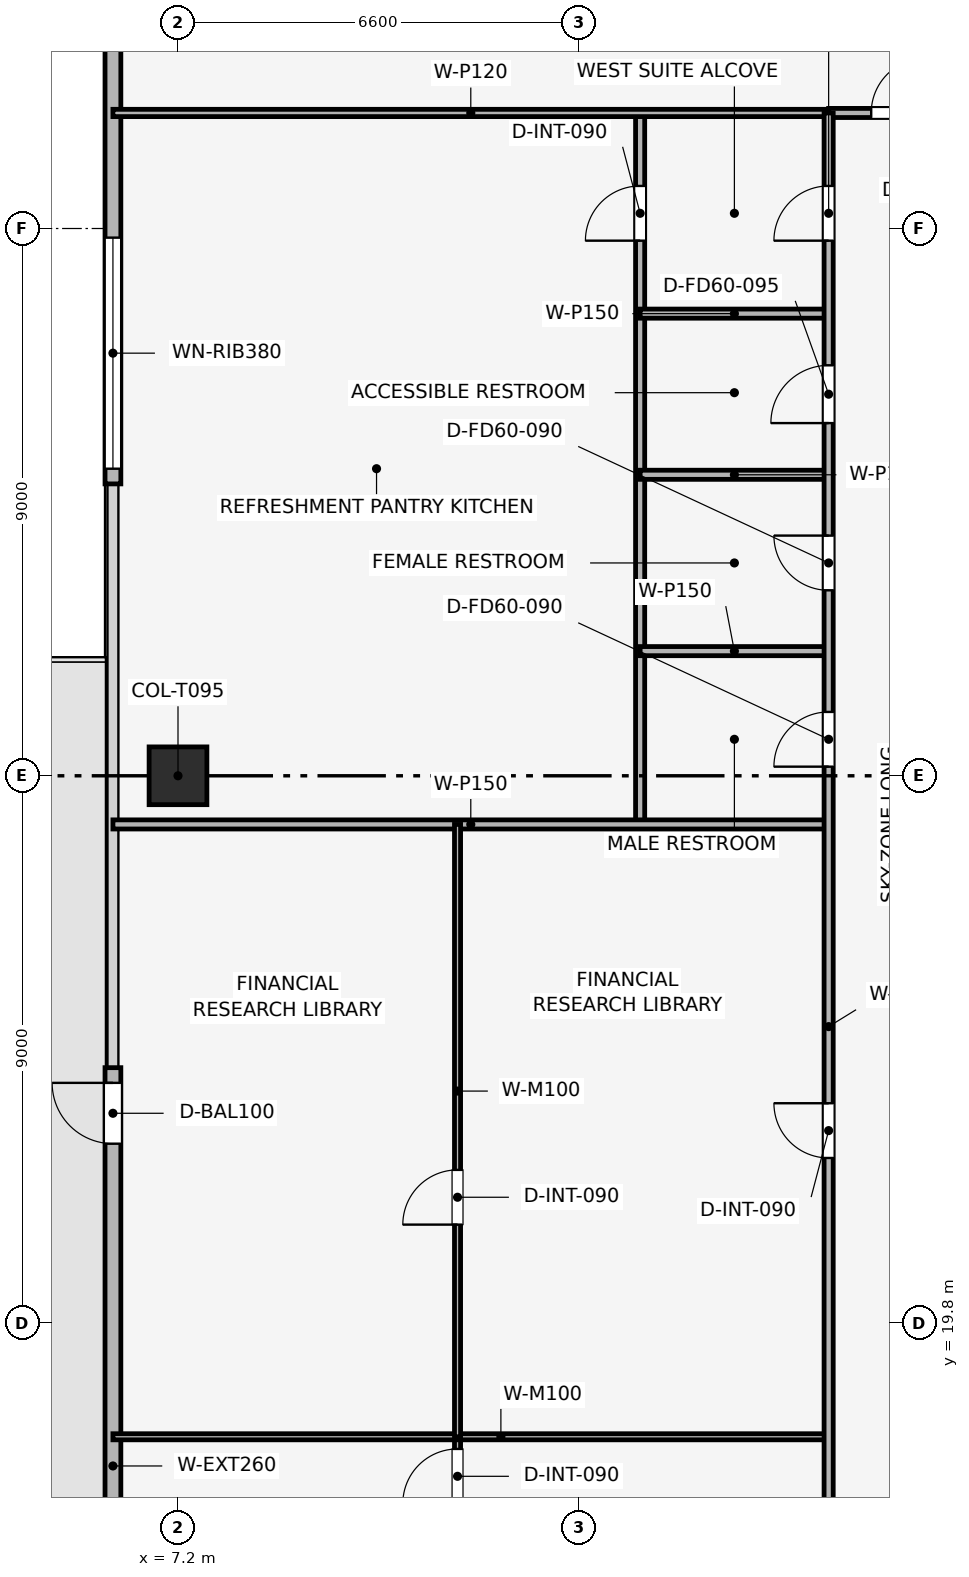
"""IFC4 building model, lengths in metres.
Left out: names, types, materials, properties, quantities, classifications, styles, units other than length and angle.
Written with IfcOpenShell. Run it as: python <this file> out.ifc"""

import sys

from ifc_helpers import new_model, si_unit, direction, frame, frame_2d, origin, origin_2d, place, context, subcontext, project, spatial, rectangle, extrude, element, fill, save


model = new_model("IFC4")
c1 = context("Model", 3, precision=1e-05, world=origin(), true_north=direction((0.0, 1.0)))
c2 = subcontext(c1, "Body", "Model", "MODEL_VIEW")
j1 = project(units=[si_unit("LENGTHUNIT", "METRE"), si_unit("PLANEANGLEUNIT", "RADIAN")], contexts=[c1])
p1 = place(None, origin())
s1 = spatial("IfcSite", under=j1, at=p1, CompositionType="ELEMENT")
p2 = place(p1, origin())
s2 = spatial("IfcBuilding", under=s1, at=p2, CompositionType="ELEMENT")
p3 = place(p2, frame((0.0, 0.0, 329.25)))
s3 = spatial("IfcBuildingStorey", under=s2, at=p3, CompositionType="ELEMENT", Elevation=329.25)
p4 = place(p3, frame((7.2, 28.8, 0.003), z_axis=(0.158092459532, 0.0, 0.98742431317), x_axis=(0.0, 1.0, 0.0)))
e1 = element("IfcColumn", 1, at=p4, inside=s3, PredefinedType="COLUMN", context=c2, shape_type="SweptSolid", body=[
    extrude(rectangle(XDim=0.95, YDim=0.95, at=origin_2d()), origin(), (0.0, 0.0, 1.0), 3.549),
])
p5 = place(p3, frame((6.13, 12.3, 0.0), z_axis=(0.0, 0.0, 1.0), x_axis=(0.0, 1.0, 0.0)))
e2 = element("IfcWall", 2, at=p5, inside=s3, PredefinedType="SOLIDWALL", context=c2, shape_type="SweptSolid", body=[
    extrude(rectangle(XDim=11.7, YDim=0.26, at=frame_2d((5.85, 0.0))), origin(), (0.0, 0.0, 1.0), 3.51),
])
p6 = place(p5, frame((10.45, 0.0, 0.0)))
e3 = element("IfcOpeningElement", 3, at=p6, cuts=e2, PredefinedType="OPENING", context=c2, shape_type="SweptSolid", body=[
    extrude(rectangle(XDim=1.0, YDim=2.2, at=frame_2d((0.5, 1.1))), frame((0.0, 0.14, 0.0), z_axis=(0.0, -1.0, 0.0), x_axis=(1.0, 0.0, 0.0)), (0.0, 0.0, 1.0), 0.28),
])
p7 = place(p3, frame((6.13, 33.6, 0.0), z_axis=(0.0, 0.0, 1.0), x_axis=(0.0, 1.0, 0.0)))
e4 = element("IfcWall", 4, at=p7, inside=s3, PredefinedType="SOLIDWALL", context=c2, shape_type="SweptSolid", body=[
    extrude(rectangle(XDim=11.7, YDim=0.26, at=frame_2d((5.85, 0.0))), origin(), (0.0, 0.0, 1.0), 3.51),
])
p8 = place(p7, frame((0.25, 0.0, 0.9)))
e5 = element("IfcOpeningElement", 5, at=p8, cuts=e4, PredefinedType="OPENING", context=c2, shape_type="SweptSolid", body=[
    extrude(rectangle(XDim=3.8, YDim=1.9, at=frame_2d((1.9, 0.95))), frame((0.0, 0.14, 0.0), z_axis=(0.0, -1.0, 0.0), x_axis=(1.0, 0.0, 0.0)), (0.0, 0.0, 1.0), 0.28),
])
p9 = place(p3, frame((14.8, 28.0, 0.0), z_axis=(0.0, 0.0, 1.0), x_axis=(0.0, 1.0, 0.0)))
e6 = element("IfcWall", 6, at=p9, inside=s3, PredefinedType="PARTITIONING", context=c2, shape_type="SweptSolid", body=[
    extrude(rectangle(XDim=11.7, YDim=0.15, at=frame_2d((5.85, 0.0))), origin(), (0.0, 0.0, 1.0), 3.095),
])
p10 = place(p9, frame((9.6, 0.0, 0.0)))
e7 = element("IfcOpeningElement", 7, at=p10, cuts=e6, PredefinedType="OPENING", context=c2, shape_type="SweptSolid", body=[
    extrude(rectangle(XDim=0.9, YDim=2.1, at=frame_2d((0.45, 1.05))), frame((0.0, 0.085, 0.0), z_axis=(0.0, -1.0, 0.0), x_axis=(1.0, 0.0, 0.0)), (0.0, 0.0, 1.0), 0.17),
])
p11 = place(p3, frame((6.13, 28.0, 0.0), z_axis=(0.0, 0.0, 1.0), x_axis=(1.0, 0.0, 0.0)))
e8 = element("IfcWall", 8, at=p11, inside=s3, PredefinedType="PARTITIONING", context=c2, shape_type="SweptSolid", body=[
    extrude(rectangle(XDim=11.77, YDim=0.15, at=frame_2d((5.885, 0.0))), origin(), (0.0, 0.0, 1.0), 3.135),
])
for number, where, z_axis, x_axis in (
    (9, (14.8, 36.4, 0.0), (0.0, 0.0, 1.0), (1.0, 0.0, 0.0)),
    (10, (14.8, 30.85, 0.0), (0.0, 0.0, 1.0), (1.0, 0.0, 0.0)),
    (11, (14.8, 33.75, 0.0), (0.0, 0.0, 1.0), (1.0, 0.0, 0.0)),
):
    element("IfcWall", number, at=place(p3, frame(where, z_axis=z_axis, x_axis=x_axis)), inside=s3, PredefinedType="PARTITIONING", context=c2, shape_type="SweptSolid", body=[
        extrude(rectangle(XDim=3.1, YDim=0.15, at=frame_2d((1.55, 0.0))), origin(), (0.0, 0.0, 1.0), 3.135),
    ])
p12 = place(p3, frame((11.797, 12.3, 0.0), z_axis=(0.0, 0.0, 1.0), x_axis=(0.0, 1.0, 0.0)))
e12 = element("IfcWall", 12, at=p12, inside=s3, PredefinedType="MOVABLE", context=c2, shape_type="SweptSolid", body=[
    extrude(rectangle(XDim=5.63, YDim=0.1, at=frame_2d((2.815, 0.0))), origin(), (0.0, 0.0, 1.0), 3.195),
])
p13 = place(p12, frame((4.53, 0.0, 0.0)))
e13 = element("IfcOpeningElement", 13, at=p13, cuts=e12, PredefinedType="OPENING", context=c2, shape_type="SweptSolid", body=[
    extrude(rectangle(XDim=0.9, YDim=2.1, at=frame_2d((0.45, 1.05))), frame((0.0, 0.06, 0.0), z_axis=(0.0, -1.0, 0.0), x_axis=(1.0, 0.0, 0.0)), (0.0, 0.0, 1.0), 0.12),
])
p14 = place(p3, frame((6.13, 17.93, 0.0), z_axis=(0.0, 0.0, 1.0), x_axis=(1.0, 0.0, 0.0)))
e14 = element("IfcWall", 14, at=p14, inside=s3, PredefinedType="MOVABLE", context=c2, shape_type="SweptSolid", body=[
    extrude(rectangle(XDim=11.77, YDim=0.1, at=frame_2d((5.885, 0.0))), origin(), (0.0, 0.0, 1.0), 3.095),
])
p15 = place(p3, frame((11.797, 17.93, 0.0), z_axis=(0.0, 0.0, 1.0), x_axis=(0.0, 1.0, 0.0)))
e15 = element("IfcWall", 15, at=p15, inside=s3, PredefinedType="MOVABLE", context=c2, shape_type="SweptSolid", body=[
    extrude(rectangle(XDim=10.07, YDim=0.1, at=frame_2d((5.035, 0.0))), origin(), (0.0, 0.0, 1.0), 3.095),
])
p16 = place(p15, frame((3.489, 0.0, 0.0)))
e16 = element("IfcOpeningElement", 16, at=p16, cuts=e15, PredefinedType="OPENING", context=c2, shape_type="SweptSolid", body=[
    extrude(rectangle(XDim=0.9, YDim=2.1, at=frame_2d((0.45, 1.05))), frame((0.0, 0.06, 0.0), z_axis=(0.0, -1.0, 0.0), x_axis=(1.0, 0.0, 0.0)), (0.0, 0.0, 1.0), 0.12),
])
p17 = place(p3, frame((6.13, 39.7, 0.0), z_axis=(0.0, 0.0, 1.0), x_axis=(1.0, 0.0, 0.0)))
e17 = element("IfcWall", 17, at=p17, inside=s3, PredefinedType="PARTITIONING", context=c2, shape_type="SweptSolid", body=[
    extrude(rectangle(XDim=11.77, YDim=0.12, at=frame_2d((5.885, 0.0))), origin(), (0.0, 0.0, 1.0), 3.095),
])
p18 = place(p3, frame((17.9, 39.7, 0.0), z_axis=(0.0, 0.0, 1.0), x_axis=(1.0, 0.0, 0.0)))
e18 = element("IfcWall", 18, at=p18, inside=s3, PredefinedType="PARTITIONING", context=c2, shape_type="SweptSolid", body=[
    extrude(rectangle(XDim=21.8, YDim=0.15, at=frame_2d((10.9, 0.0))), origin(), (0.0, 0.0, 1.0), 3.095),
])
p19 = place(p18, frame((0.7, 0.0, 0.0)))
e19 = element("IfcOpeningElement", 19, at=p19, cuts=e18, PredefinedType="OPENING", context=c2, shape_type="SweptSolid", body=[
    extrude(rectangle(XDim=0.9, YDim=2.1, at=frame_2d((0.45, 1.05))), frame((0.0, 0.085, 0.0), z_axis=(0.0, -1.0, 0.0), x_axis=(1.0, 0.0, 0.0)), (0.0, 0.0, 1.0), 0.17),
])
p20 = place(p18, frame((6.053, 0.0, 0.0)))
e20 = element("IfcOpeningElement", 20, at=p20, cuts=e18, PredefinedType="OPENING", context=c2, shape_type="SweptSolid", body=[
    extrude(rectangle(XDim=0.9, YDim=2.1, at=frame_2d((0.45, 1.05))), frame((0.0, 0.085, 0.0), z_axis=(0.0, -1.0, 0.0), x_axis=(1.0, 0.0, 0.0)), (0.0, 0.0, 1.0), 0.17),
])
p21 = place(p18, frame((15.803, 0.0, 0.0)))
e21 = element("IfcOpeningElement", 21, at=p21, cuts=e18, PredefinedType="OPENING", context=c2, shape_type="SweptSolid", body=[
    extrude(rectangle(XDim=0.9, YDim=2.1, at=frame_2d((0.45, 1.05))), frame((0.0, 0.085, 0.0), z_axis=(0.0, -1.0, 0.0), x_axis=(1.0, 0.0, 0.0)), (0.0, 0.0, 1.0), 0.17),
])
p22 = place(p3, frame((17.9, 12.3, 0.0), z_axis=(0.0, 0.0, 1.0), x_axis=(0.0, 1.0, 0.0)))
e22 = element("IfcWall", 22, at=p22, inside=s3, PredefinedType="PARTITIONING", context=c2, shape_type="SweptSolid", body=[
    extrude(rectangle(XDim=27.4, YDim=0.15, at=frame_2d((13.7, 0.0))), origin(), (0.0, 0.0, 1.0), 3.095),
])
p23 = place(p22, frame((2.365, 0.0, 0.0)))
e23 = element("IfcOpeningElement", 23, at=p23, cuts=e22, PredefinedType="OPENING", context=c2, shape_type="SweptSolid", body=[
    extrude(rectangle(XDim=0.9, YDim=2.1, at=frame_2d((0.45, 1.05))), frame((0.0, 0.085, 0.0), z_axis=(0.0, -1.0, 0.0), x_axis=(1.0, 0.0, 0.0)), (0.0, 0.0, 1.0), 0.17),
])
p24 = place(p22, frame((10.215, 0.0, 0.0)))
e24 = element("IfcOpeningElement", 24, at=p24, cuts=e22, PredefinedType="OPENING", context=c2, shape_type="SweptSolid", body=[
    extrude(rectangle(XDim=0.9, YDim=2.1, at=frame_2d((0.45, 1.05))), frame((0.0, 0.085, 0.0), z_axis=(0.0, -1.0, 0.0), x_axis=(1.0, 0.0, 0.0)), (0.0, 0.0, 1.0), 0.17),
])
p25 = place(p22, frame((16.65, 0.0, 0.0)))
e25 = element("IfcOpeningElement", 25, at=p25, cuts=e22, PredefinedType="OPENING", context=c2, shape_type="SweptSolid", body=[
    extrude(rectangle(XDim=0.9, YDim=2.1, at=frame_2d((0.45, 1.05))), frame((0.0, 0.085, 0.0), z_axis=(0.0, -1.0, 0.0), x_axis=(1.0, 0.0, 0.0)), (0.0, 0.0, 1.0), 0.17),
])
p26 = place(p22, frame((19.55, 0.0, 0.0)))
e26 = element("IfcOpeningElement", 26, at=p26, cuts=e22, PredefinedType="OPENING", context=c2, shape_type="SweptSolid", body=[
    extrude(rectangle(XDim=0.9, YDim=2.1, at=frame_2d((0.45, 1.05))), frame((0.0, 0.085, 0.0), z_axis=(0.0, -1.0, 0.0), x_axis=(1.0, 0.0, 0.0)), (0.0, 0.0, 1.0), 0.17),
])
p27 = place(p22, frame((22.3, 0.0, 0.0)))
e27 = element("IfcOpeningElement", 27, at=p27, cuts=e22, PredefinedType="OPENING", context=c2, shape_type="SweptSolid", body=[
    extrude(rectangle(XDim=0.95, YDim=2.1, at=frame_2d((0.475, 1.05))), frame((0.0, 0.085, 0.0), z_axis=(0.0, -1.0, 0.0), x_axis=(1.0, 0.0, 0.0)), (0.0, 0.0, 1.0), 0.17),
])
p28 = place(p22, frame((25.3, 0.0, 0.0)))
e28 = element("IfcOpeningElement", 28, at=p28, cuts=e22, PredefinedType="OPENING", context=c2, shape_type="SweptSolid", body=[
    extrude(rectangle(XDim=0.9, YDim=2.1, at=frame_2d((0.45, 1.05))), frame((0.0, 0.085, 0.0), z_axis=(0.0, -1.0, 0.0), x_axis=(1.0, 0.0, 0.0)), (0.0, 0.0, 1.0), 0.17),
])
p29 = place(p6, origin())
e29 = element("IfcDoor", 29, at=p29, inside=s3, OperationType="SINGLE_SWING_RIGHT", PredefinedType="DOOR", context=c2, shape_type="SweptSolid", body=[
    extrude(rectangle(XDim=1.0, YDim=2.2, at=frame_2d((0.5, 1.1))), frame((0.0, 0.025, 0.0), z_axis=(0.0, -1.0, 0.0), x_axis=(1.0, 0.0, 0.0)), (0.0, 0.0, 1.0), 0.05),
])
fill(e3, e29)
p30 = place(p8, origin())
e30 = element("IfcWindow", 30, at=p30, inside=s3, PartitioningType="SINGLE_PANEL", PredefinedType="WINDOW", context=c2, shape_type="SweptSolid", body=[
    extrude(rectangle(XDim=3.8, YDim=1.9, at=frame_2d((1.9, 0.95))), frame((0.0, 0.03, 0.0), z_axis=(0.0, -1.0, 0.0), x_axis=(1.0, 0.0, 0.0)), (0.0, 0.0, 1.0), 0.06),
])
fill(e5, e30)
p31 = place(p10, origin())
e31 = element("IfcDoor", 31, at=p31, inside=s3, OperationType="SINGLE_SWING_LEFT", PredefinedType="DOOR", context=c2, shape_type="SweptSolid", body=[
    extrude(rectangle(XDim=0.9, YDim=2.1, at=frame_2d((0.45, 1.05))), frame((0.0, 0.025, 0.0), z_axis=(0.0, -1.0, 0.0), x_axis=(1.0, 0.0, 0.0)), (0.0, 0.0, 1.0), 0.05),
])
fill(e7, e31)
p32 = place(p13, origin())
e32 = element("IfcDoor", 32, at=p32, inside=s3, OperationType="SINGLE_SWING_LEFT", PredefinedType="DOOR", context=c2, shape_type="SweptSolid", body=[
    extrude(rectangle(XDim=0.9, YDim=2.1, at=frame_2d((0.45, 1.05))), frame((0.0, 0.025, 0.0), z_axis=(0.0, -1.0, 0.0), x_axis=(1.0, 0.0, 0.0)), (0.0, 0.0, 1.0), 0.05),
])
fill(e13, e32)
p33 = place(p16, origin())
e33 = element("IfcDoor", 33, at=p33, inside=s3, OperationType="SINGLE_SWING_LEFT", PredefinedType="DOOR", context=c2, shape_type="SweptSolid", body=[
    extrude(rectangle(XDim=0.9, YDim=2.1, at=frame_2d((0.45, 1.05))), frame((0.0, 0.025, 0.0), z_axis=(0.0, -1.0, 0.0), x_axis=(1.0, 0.0, 0.0)), (0.0, 0.0, 1.0), 0.05),
])
fill(e16, e33)
p34 = place(p19, origin())
e34 = element("IfcDoor", 34, at=p34, inside=s3, OperationType="SINGLE_SWING_RIGHT", PredefinedType="DOOR", context=c2, shape_type="SweptSolid", body=[
    extrude(rectangle(XDim=0.9, YDim=2.1, at=frame_2d((0.45, 1.05))), frame((0.0, 0.025, 0.0), z_axis=(0.0, -1.0, 0.0), x_axis=(1.0, 0.0, 0.0)), (0.0, 0.0, 1.0), 0.05),
])
fill(e19, e34)
p35 = place(p24, origin())
e35 = element("IfcDoor", 35, at=p35, inside=s3, OperationType="SINGLE_SWING_RIGHT", PredefinedType="DOOR", context=c2, shape_type="SweptSolid", body=[
    extrude(rectangle(XDim=0.9, YDim=2.1, at=frame_2d((0.45, 1.05))), frame((0.0, 0.025, 0.0), z_axis=(0.0, -1.0, 0.0), x_axis=(1.0, 0.0, 0.0)), (0.0, 0.0, 1.0), 0.05),
])
fill(e24, e35)
p36 = place(p25, origin())
e36 = element("IfcDoor", 36, at=p36, inside=s3, OperationType="SINGLE_SWING_LEFT", PredefinedType="DOOR", context=c2, shape_type="SweptSolid", body=[
    extrude(rectangle(XDim=0.9, YDim=2.1, at=frame_2d((0.45, 1.05))), frame((0.0, 0.025, 0.0), z_axis=(0.0, -1.0, 0.0), x_axis=(1.0, 0.0, 0.0)), (0.0, 0.0, 1.0), 0.05),
])
fill(e25, e36)
p37 = place(p26, origin())
e37 = element("IfcDoor", 37, at=p37, inside=s3, OperationType="SINGLE_SWING_RIGHT", PredefinedType="DOOR", context=c2, shape_type="SweptSolid", body=[
    extrude(rectangle(XDim=0.9, YDim=2.1, at=frame_2d((0.45, 1.05))), frame((0.0, 0.025, 0.0), z_axis=(0.0, -1.0, 0.0), x_axis=(1.0, 0.0, 0.0)), (0.0, 0.0, 1.0), 0.05),
])
fill(e26, e37)
p38 = place(p27, origin())
e38 = element("IfcDoor", 38, at=p38, inside=s3, OperationType="SINGLE_SWING_LEFT", PredefinedType="DOOR", context=c2, shape_type="SweptSolid", body=[
    extrude(rectangle(XDim=0.95, YDim=2.1, at=frame_2d((0.475, 1.05))), frame((0.0, 0.025, 0.0), z_axis=(0.0, -1.0, 0.0), x_axis=(1.0, 0.0, 0.0)), (0.0, 0.0, 1.0), 0.05),
])
fill(e27, e38)
p39 = place(p28, origin())
e39 = element("IfcDoor", 39, at=p39, inside=s3, OperationType="SINGLE_SWING_LEFT", PredefinedType="DOOR", context=c2, shape_type="SweptSolid", body=[
    extrude(rectangle(XDim=0.9, YDim=2.1, at=frame_2d((0.45, 1.05))), frame((0.0, 0.025, 0.0), z_axis=(0.0, -1.0, 0.0), x_axis=(1.0, 0.0, 0.0)), (0.0, 0.0, 1.0), 0.05),
])
fill(e28, e39)
save(model, sys.argv[1])
